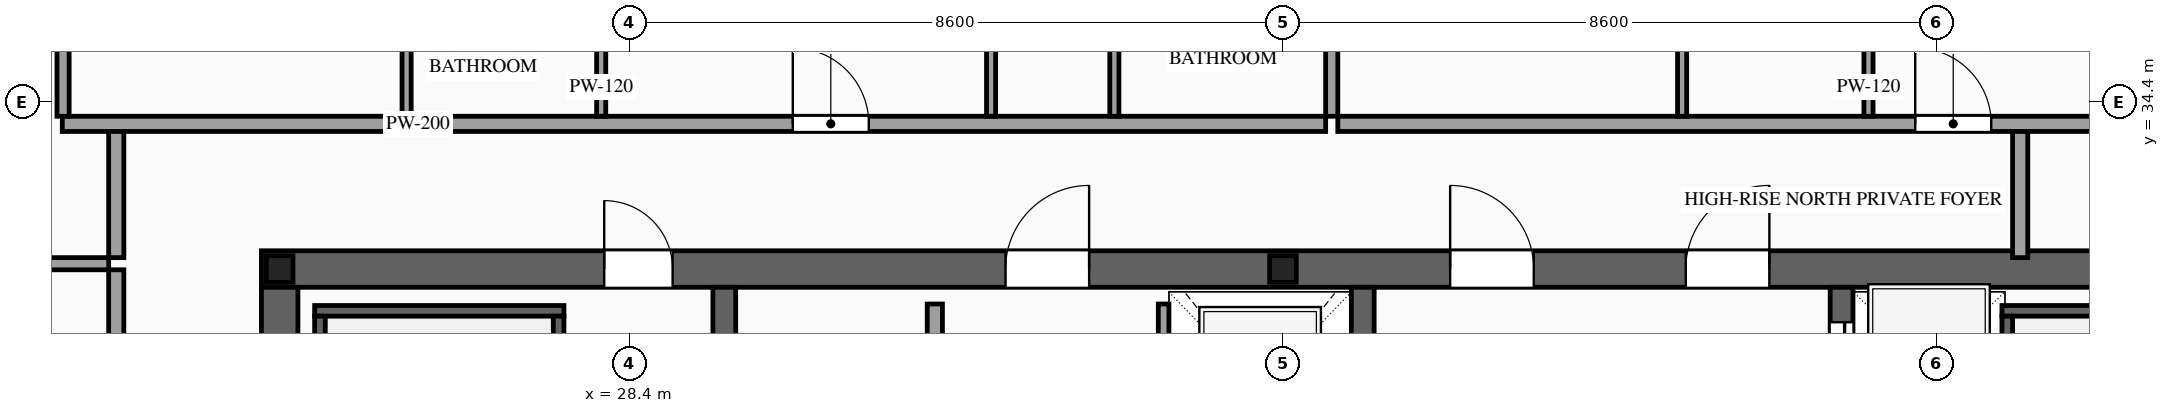
"""IFC4 building model, lengths in metres.
Left out: names, types, materials, properties, quantities, classifications, styles, units other than length and angle.
Written with IfcOpenShell. Run it as: python <this file> out.ifc"""

import sys

from ifc_helpers import new_model, si_unit, direction, frame, frame_2d, origin, origin_2d, place, context, subcontext, project, spatial, rectangle, i_section, extrude, source, transform, mapped, element, fill, save


model = new_model("IFC4")
c1 = context("Model", 3, precision=1e-05, world=origin(), true_north=direction((0.0, 1.0)))
c2 = subcontext(c1, "Body", "Model", "MODEL_VIEW")
j1 = project(units=[si_unit("LENGTHUNIT", "METRE"), si_unit("PLANEANGLEUNIT", "RADIAN")], contexts=[c1])
p1 = place(None, origin())
s1 = spatial("IfcSite", under=j1, at=p1, CompositionType="ELEMENT")
p2 = place(p1, origin())
s2 = spatial("IfcBuilding", under=s1, at=p2, CompositionType="ELEMENT")
p3 = place(p2, frame((0.0, 0.0, 285.6)))
s3 = spatial("IfcBuildingStorey", under=s2, at=p3, CompositionType="ELEMENT", Elevation=285.6)
p4 = place(p3, frame((23.56, 32.2, 0.0), z_axis=(0.0, 0.0, 1.0), x_axis=(1.0, 0.0, 0.0)))
e1 = element("IfcWall", 1, at=p4, inside=s3, PredefinedType="SHEAR", context=c2, shape_type="SweptSolid", body=[
    extrude(rectangle(XDim=26.88, YDim=0.48, at=frame_2d((13.44, 0.0))), origin(), (0.0, 0.0, 1.0), 3.5),
])
p5 = place(p4, frame((4.51, 0.0, 0.0)))
e2 = element("IfcOpeningElement", 2, at=p5, cuts=e1, PredefinedType="OPENING", context=c2, shape_type="SweptSolid", body=[
    extrude(rectangle(XDim=0.9, YDim=2.15, at=frame_2d((0.45, 1.075))), frame((0.0, 0.255, 0.0), z_axis=(0.0, -1.0, 0.0), x_axis=(1.0, 0.0, 0.0)), (0.0, 0.0, 1.0), 0.51),
])
p6 = place(p4, frame((9.79, 0.0, 0.0)))
e3 = element("IfcOpeningElement", 3, at=p6, cuts=e1, PredefinedType="OPENING", context=c2, shape_type="SweptSolid", body=[
    extrude(rectangle(XDim=1.1, YDim=2.2, at=frame_2d((0.55, 1.1))), frame((0.0, 0.255, 0.0), z_axis=(0.0, -1.0, 0.0), x_axis=(1.0, 0.0, 0.0)), (0.0, 0.0, 1.0), 0.51),
])
p7 = place(p4, frame((15.64, 0.0, 0.0)))
e4 = element("IfcOpeningElement", 4, at=p7, cuts=e1, PredefinedType="OPENING", context=c2, shape_type="SweptSolid", body=[
    extrude(rectangle(XDim=1.1, YDim=2.2, at=frame_2d((0.55, 1.1))), frame((0.0, 0.255, 0.0), z_axis=(0.0, -1.0, 0.0), x_axis=(1.0, 0.0, 0.0)), (0.0, 0.0, 1.0), 0.51),
])
p8 = place(p4, frame((18.74, 0.0, 0.0)))
e5 = element("IfcOpeningElement", 5, at=p8, cuts=e1, PredefinedType="OPENING", context=c2, shape_type="SweptSolid", body=[
    extrude(rectangle(XDim=1.1, YDim=2.2, at=frame_2d((0.55, 1.1))), frame((0.0, 0.255, 0.0), z_axis=(0.0, -1.0, 0.0), x_axis=(1.0, 0.0, 0.0)), (0.0, 0.0, 1.0), 0.51),
])
m1 = source(origin(), c2, "Body", "SweptSolid", [
    extrude(rectangle(XDim=12.32, YDim=0.48, at=frame_2d((6.16, 0.0))), origin(), (0.0, 0.0, 1.0), 3.5),
])
p9 = place(p3, frame((23.8, 19.64, 0.0), z_axis=(0.0, 0.0, 1.0), x_axis=(0.0, 1.0, 0.0)))
e6 = element("IfcWall", 6, at=p9, inside=s3, PredefinedType="SHEAR", context=c2, shape_type="MappedRepresentation", body=[
    mapped(m1, transform((0.0, 0.0, 0.0), scale=1.0)),
])
m2 = source(origin(), c2, "Body", "SweptSolid", [
    extrude(rectangle(XDim=12.32, YDim=0.3, at=frame_2d((6.16, 0.0))), origin(), (0.0, 0.0, 1.0), 3.5),
])
for number, where, z_axis, x_axis in (
    (7, (29.65, 19.64, 0.0), (0.0, 0.0, 1.0), (0.0, 1.0, 0.0)),
    (8, (38.05, 19.64, 0.0), (0.0, 0.0, 1.0), (0.0, 1.0, 0.0)),
):
    element("IfcWall", number, at=place(p3, frame(where, z_axis=z_axis, x_axis=x_axis)), inside=s3, PredefinedType="SOLIDWALL", context=c2, shape_type="MappedRepresentation", body=[
        mapped(m2, transform((0.0, 0.0, 0.0), scale=1.0)),
    ])
p10 = place(p3, frame((44.35, 19.64, 0.0), z_axis=(0.0, 0.0, 1.0), x_axis=(0.0, 1.0, 0.0)))
e9 = element("IfcWall", 9, at=p10, inside=s3, PredefinedType="SOLIDWALL", context=c2, shape_type="SweptSolid", body=[
    extrude(rectangle(XDim=12.32, YDim=0.3, at=frame_2d((6.16, 0.0))), origin(), (0.0, 0.0, 1.0), 3.5),
])
p11 = place(p10, frame((6.56, 0.0, 0.0)))
e10 = element("IfcOpeningElement", 10, at=p11, cuts=e9, PredefinedType="OPENING", context=c2, shape_type="SweptSolid", body=[
    extrude(rectangle(XDim=1.1, YDim=2.2, at=frame_2d((0.55, 1.1))), frame((0.0, 0.165, 0.0), z_axis=(0.0, -1.0, 0.0), x_axis=(1.0, 0.0, 0.0)), (0.0, 0.0, 1.0), 0.33),
])
p12 = place(p10, frame((8.66, 0.0, 0.0)))
e11 = element("IfcOpeningElement", 11, at=p12, cuts=e9, PredefinedType="OPENING", context=c2, shape_type="SweptSolid", body=[
    extrude(rectangle(XDim=1.1, YDim=2.2, at=frame_2d((0.55, 1.1))), frame((0.0, 0.165, 0.0), z_axis=(0.0, -1.0, 0.0), x_axis=(1.0, 0.0, 0.0)), (0.0, 0.0, 1.0), 0.33),
])
p13 = place(p10, frame((10.76, 0.0, 0.0)))
e12 = element("IfcOpeningElement", 12, at=p13, cuts=e9, PredefinedType="OPENING", context=c2, shape_type="SweptSolid", body=[
    extrude(rectangle(XDim=1.1, YDim=2.2, at=frame_2d((0.55, 1.1))), frame((0.0, 0.165, 0.0), z_axis=(0.0, -1.0, 0.0), x_axis=(1.0, 0.0, 0.0)), (0.0, 0.0, 1.0), 0.33),
])
m3 = source(origin(), c2, "Body", "SweptSolid", [
    extrude(i_section(OverallWidth=0.35, OverallDepth=0.35, WebThickness=0.012, FlangeThickness=0.019, at=origin_2d()), origin(), (0.0, 0.0, 1.0), 3.5),
])
for number, where, z_axis, x_axis in (
    (13, (23.8, 32.2, 0.0), (0.0, 0.0, 1.0), (1.0, 0.0, 0.0)),
    (14, (37.0, 32.2, 0.0), (0.0, 0.0, 1.0), (1.0, 0.0, 0.0)),
):
    element("IfcColumn", number, at=place(p3, frame(where, z_axis=z_axis, x_axis=x_axis)), inside=s3, PredefinedType="COLUMN", context=c2, shape_type="MappedRepresentation", body=[
        mapped(m3, transform((0.0, 0.0, 0.0), scale=1.0)),
    ])
p14 = place(p3, frame((35.43, 29.4, 0.0), z_axis=(0.0, 0.0, 1.0), x_axis=(0.0, 1.0, 0.0)))
e15 = element("IfcWall", 15, at=p14, inside=s3, PredefinedType="SOLIDWALL", context=c2, shape_type="SweptSolid", body=[
    extrude(rectangle(XDim=2.34, YDim=0.14, at=frame_2d((1.17, 0.0))), origin(), (0.0, 0.0, 1.0), 3.28),
])
p15 = place(p14, frame((0.62, 0.0, 0.0)))
e16 = element("IfcOpeningElement", 16, at=p15, cuts=e15, PredefinedType="OPENING", context=c2, shape_type="SweptSolid", body=[
    extrude(rectangle(XDim=1.1, YDim=2.2, at=frame_2d((0.55, 1.1))), frame((0.0, 0.085, 0.0), z_axis=(0.0, -1.0, 0.0), x_axis=(1.0, 0.0, 0.0)), (0.0, 0.0, 1.0), 0.17),
])
m4 = source(origin(), c2, "Body", "SweptSolid", [
    extrude(rectangle(XDim=3.28, YDim=0.14, at=frame_2d((1.64, 0.0))), origin(), (0.0, 0.0, 1.0), 3.28),
])
p16 = place(p3, frame((24.26, 31.65, 0.0), z_axis=(0.0, 0.0, 1.0), x_axis=(1.0, 0.0, 0.0)))
e17 = element("IfcWall", 17, at=p16, inside=s3, PredefinedType="SOLIDWALL", context=c2, shape_type="MappedRepresentation", body=[
    mapped(m4, transform((0.0, 0.0, 0.0), scale=1.0)),
])
m5 = source(origin(), c2, "Body", "SweptSolid", [
    extrude(rectangle(XDim=8.94, YDim=0.14, at=frame_2d((4.47, 0.0))), origin(), (0.0, 0.0, 1.0), 3.28),
])
for number, where, z_axis, x_axis in (
    (18, (24.33, 22.64, 0.0), (0.0, 0.0, 1.0), (0.0, 1.0, 0.0)),
    (19, (27.47, 22.64, 0.0), (0.0, 0.0, 1.0), (0.0, 1.0, 0.0)),
):
    element("IfcWall", number, at=place(p3, frame(where, z_axis=z_axis, x_axis=x_axis)), inside=s3, PredefinedType="SOLIDWALL", context=c2, shape_type="MappedRepresentation", body=[
        mapped(m5, transform((0.0, 0.0, 0.0), scale=1.0)),
    ])
p17 = place(p3, frame((46.46, 31.65, 0.0), z_axis=(0.0, 0.0, 1.0), x_axis=(1.0, 0.0, 0.0)))
e20 = element("IfcWall", 20, at=p17, inside=s3, PredefinedType="SOLIDWALL", context=c2, shape_type="MappedRepresentation", body=[
    mapped(m4, transform((0.0, 0.0, 0.0), scale=1.0)),
])
p18 = place(p3, frame((46.53, 22.64, 0.0), z_axis=(0.0, 0.0, 1.0), x_axis=(0.0, 1.0, 0.0)))
e21 = element("IfcWall", 21, at=p18, inside=s3, PredefinedType="SOLIDWALL", context=c2, shape_type="MappedRepresentation", body=[
    mapped(m5, transform((0.0, 0.0, 0.0), scale=1.0)),
])
p19 = place(p3, frame((32.42, 24.05, 0.0), z_axis=(0.0, 0.0, 1.0), x_axis=(0.0, 1.0, 0.0)))
e22 = element("IfcWall", 22, at=p19, inside=s3, PredefinedType="PARTITIONING", context=c2, shape_type="SweptSolid", body=[
    extrude(rectangle(XDim=7.69, YDim=0.2, at=frame_2d((3.845, 0.0))), origin(), (0.0, 0.0, 1.0), 3.28),
])
p20 = place(p19, frame((3.395, 0.0, 0.0)))
e23 = element("IfcOpeningElement", 23, at=p20, cuts=e22, PredefinedType="OPENING", context=c2, shape_type="SweptSolid", body=[
    extrude(rectangle(XDim=0.9, YDim=2.15, at=frame_2d((0.45, 1.075))), frame((0.0, 0.115, 0.0), z_axis=(0.0, -1.0, 0.0), x_axis=(1.0, 0.0, 0.0)), (0.0, 0.0, 1.0), 0.23),
])
m6 = source(origin(), c2, "Body", "SweptSolid", [
    extrude(rectangle(XDim=1.7, YDim=0.2, at=frame_2d((0.85, 0.0))), origin(), (0.0, 0.0, 1.0), 3.28),
])
for number, where, z_axis, x_axis in (
    (24, (21.65, 32.35, 0.0), (0.0, 0.0, 1.0), (0.0, 1.0, 0.0)),
    (25, (46.7, 32.35, 0.0), (0.0, 0.0, 1.0), (0.0, 1.0, 0.0)),
):
    element("IfcWall", number, at=place(p3, frame(where, z_axis=z_axis, x_axis=x_axis)), inside=s3, PredefinedType="PARTITIONING", context=c2, shape_type="MappedRepresentation", body=[
        mapped(m6, transform((0.0, 0.0, 0.0), scale=1.0)),
    ])
p21 = place(p3, frame((20.94, 34.11, 0.0), z_axis=(0.0, 0.0, 1.0), x_axis=(1.0, 0.0, 0.0)))
e26 = element("IfcWall", 26, at=p21, inside=s3, PredefinedType="PARTITIONING", context=c2, shape_type="SweptSolid", body=[
    extrude(rectangle(XDim=16.622, YDim=0.2, at=frame_2d((8.311, 0.0))), origin(), (0.0, 0.0, 1.0), 3.28),
])
p22 = place(p21, frame((9.611, 0.0, 0.0)))
e27 = element("IfcOpeningElement", 27, at=p22, cuts=e26, PredefinedType="OPENING", context=c2, shape_type="SweptSolid", body=[
    extrude(rectangle(XDim=1.0, YDim=2.2, at=frame_2d((0.5, 1.1))), frame((0.0, 0.115, 0.0), z_axis=(0.0, -1.0, 0.0), x_axis=(1.0, 0.0, 0.0)), (0.0, 0.0, 1.0), 0.23),
])
m7 = source(origin(), c2, "Body", "SweptSolid", [
    extrude(rectangle(XDim=10.54, YDim=0.16, at=frame_2d((5.27, 0.0))), origin(), (0.0, 0.0, 1.0), 3.28),
])
p23 = place(p3, frame((37.642, 34.21, 0.0), z_axis=(0.0, 0.0, 1.0), x_axis=(0.0, 1.0, 0.0)))
e28 = element("IfcWall", 28, at=p23, inside=s3, PredefinedType="PARTITIONING", context=c2, shape_type="MappedRepresentation", body=[
    mapped(m7, transform((0.0, 0.0, 0.0), scale=1.0)),
])
m8 = source(origin(), c2, "Body", "SweptSolid", [
    extrude(rectangle(XDim=2.9, YDim=0.12, at=frame_2d((1.45, 0.0))), origin(), (0.0, 0.0, 1.0), 3.28),
])
p24 = place(p3, frame((25.47, 34.21, 0.0), z_axis=(0.0, 0.0, 1.0), x_axis=(0.0, 1.0, 0.0)))
e29 = element("IfcWall", 29, at=p24, inside=s3, PredefinedType="PARTITIONING", context=c2, shape_type="MappedRepresentation", body=[
    mapped(m8, transform((0.0, 0.0, 0.0), scale=1.0)),
])
p25 = place(p3, frame((28.03, 34.21, 0.0), z_axis=(0.0, 0.0, 1.0), x_axis=(0.0, 1.0, 0.0)))
e30 = element("IfcWall", 30, at=p25, inside=s3, PredefinedType="PARTITIONING", context=c2, shape_type="SweptSolid", body=[
    extrude(rectangle(XDim=2.9, YDim=0.12, at=frame_2d((1.45, 0.0))), origin(), (0.0, 0.0, 1.0), 3.28),
])
p26 = place(p25, frame((1.025, 0.0, 0.0)))
e31 = element("IfcOpeningElement", 31, at=p26, cuts=e30, PredefinedType="OPENING", context=c2, shape_type="SweptSolid", body=[
    extrude(rectangle(XDim=0.85, YDim=2.1, at=frame_2d((0.425, 1.05))), frame((0.0, 0.075, 0.0), z_axis=(0.0, -1.0, 0.0), x_axis=(1.0, 0.0, 0.0)), (0.0, 0.0, 1.0), 0.15),
])
for number, where, z_axis, x_axis in (
    (32, (34.782, 34.21, 0.0), (0.0, 0.0, 1.0), (0.0, 1.0, 0.0)),
    (33, (33.16, 34.21, 0.0), (0.0, 0.0, 1.0), (0.0, 1.0, 0.0)),
):
    element("IfcWall", number, at=place(p3, frame(where, z_axis=z_axis, x_axis=x_axis)), inside=s3, PredefinedType="PARTITIONING", context=c2, shape_type="MappedRepresentation", body=[
        mapped(m8, transform((0.0, 0.0, 0.0), scale=1.0)),
    ])
p27 = place(p3, frame((37.722, 34.11, 0.0), z_axis=(0.0, 0.0, 1.0), x_axis=(1.0, 0.0, 0.0)))
e34 = element("IfcWall", 34, at=p27, inside=s3, PredefinedType="PARTITIONING", context=c2, shape_type="SweptSolid", body=[
    extrude(rectangle(XDim=15.338, YDim=0.2, at=frame_2d((7.669, 0.0))), origin(), (0.0, 0.0, 1.0), 3.28),
])
p28 = place(p27, frame((7.597, 0.0, 0.0)))
e35 = element("IfcOpeningElement", 35, at=p28, cuts=e34, PredefinedType="OPENING", context=c2, shape_type="SweptSolid", body=[
    extrude(rectangle(XDim=1.0, YDim=2.2, at=frame_2d((0.5, 1.1))), frame((0.0, 0.115, 0.0), z_axis=(0.0, -1.0, 0.0), x_axis=(1.0, 0.0, 0.0)), (0.0, 0.0, 1.0), 0.23),
])
m9 = source(origin(), c2, "Body", "SweptSolid", [
    extrude(rectangle(XDim=10.39, YDim=0.16, at=frame_2d((5.195, 0.0))), origin(), (0.0, 0.0, 1.0), 3.28),
])
p29 = place(p3, frame((20.95, 34.21, 0.0), z_axis=(0.0, 0.0, 1.0), x_axis=(0.0, 1.0, 0.0)))
e36 = element("IfcWall", 36, at=p29, inside=s3, PredefinedType="PARTITIONING", context=c2, shape_type="MappedRepresentation", body=[
    mapped(m9, transform((0.0, 0.0, 0.0), scale=1.0)),
])
p30 = place(p3, frame((42.252, 34.21, 0.0), z_axis=(0.0, 0.0, 1.0), x_axis=(0.0, 1.0, 0.0)))
e37 = element("IfcWall", 37, at=p30, inside=s3, PredefinedType="PARTITIONING", context=c2, shape_type="MappedRepresentation", body=[
    mapped(m8, transform((0.0, 0.0, 0.0), scale=1.0)),
])
p31 = place(p3, frame((44.704, 34.21, 0.0), z_axis=(0.0, 0.0, 1.0), x_axis=(0.0, 1.0, 0.0)))
e38 = element("IfcWall", 38, at=p31, inside=s3, PredefinedType="PARTITIONING", context=c2, shape_type="SweptSolid", body=[
    extrude(rectangle(XDim=2.9, YDim=0.12, at=frame_2d((1.45, 0.0))), origin(), (0.0, 0.0, 1.0), 3.28),
])
p32 = place(p31, frame((1.025, 0.0, 0.0)))
e39 = element("IfcOpeningElement", 39, at=p32, cuts=e38, PredefinedType="OPENING", context=c2, shape_type="SweptSolid", body=[
    extrude(rectangle(XDim=0.85, YDim=2.1, at=frame_2d((0.425, 1.05))), frame((0.0, 0.075, 0.0), z_axis=(0.0, -1.0, 0.0), x_axis=(1.0, 0.0, 0.0)), (0.0, 0.0, 1.0), 0.15),
])
p33 = place(p3, frame((21.65, 19.41, 0.0), z_axis=(0.0, 0.0, 1.0), x_axis=(0.0, 1.0, 0.0)))
e40 = element("IfcWall", 40, at=p33, inside=s3, PredefinedType="PARTITIONING", context=c2, shape_type="SweptSolid", body=[
    extrude(rectangle(XDim=12.78, YDim=0.2, at=frame_2d((6.39, 0.0))), origin(), (0.0, 0.0, 1.0), 3.28),
])
p34 = place(p33, frame((5.89, 0.0, 0.0)))
e41 = element("IfcOpeningElement", 41, at=p34, cuts=e40, PredefinedType="OPENING", context=c2, shape_type="SweptSolid", body=[
    extrude(rectangle(XDim=1.0, YDim=2.2, at=frame_2d((0.5, 1.1))), frame((0.0, 0.115, 0.0), z_axis=(0.0, -1.0, 0.0), x_axis=(1.0, 0.0, 0.0)), (0.0, 0.0, 1.0), 0.23),
])
m10 = source(origin(), c2, "Body", "SweptSolid", [
    extrude(rectangle(XDim=3.5, YDim=0.16, at=frame_2d((1.75, 0.0))), origin(), (0.0, 0.0, 1.0), 2.825),
])
p35 = place(p3, frame((18.05, 32.27, 0.0), z_axis=(0.0, 0.0, 1.0), x_axis=(1.0, 0.0, 0.0)))
e42 = element("IfcWall", 42, at=p35, inside=s3, PredefinedType="PARTITIONING", context=c2, shape_type="MappedRepresentation", body=[
    mapped(m10, transform((0.0, 0.0, 0.0), scale=1.0)),
])
m11 = source(origin(), c2, "Body", "SweptSolid", [
    extrude(rectangle(XDim=1.1, YDim=2.2, at=frame_2d((0.55, 1.1))), frame((0.0, 0.025, 0.0), z_axis=(0.0, -1.0, 0.0), x_axis=(1.0, 0.0, 0.0)), (0.0, 0.0, 1.0), 0.05),
])
p36 = place(p13, origin())
e43 = element("IfcDoor", 43, at=p36, inside=s3, OperationType="SLIDING_TO_LEFT", PredefinedType="DOOR", context=c2, shape_type="MappedRepresentation", body=[
    mapped(m11, transform((0.0, 0.0, 0.0), scale=1.0)),
])
fill(e12, e43)
m12 = source(origin(), c2, "Body", "SweptSolid", [
    extrude(rectangle(XDim=0.9, YDim=2.15, at=frame_2d((0.45, 1.075))), frame((0.0, 0.025, 0.0), z_axis=(0.0, -1.0, 0.0), x_axis=(1.0, 0.0, 0.0)), (0.0, 0.0, 1.0), 0.05),
])
p37 = place(p5, origin())
e44 = element("IfcDoor", 44, at=p37, inside=s3, OperationType="SINGLE_SWING_LEFT", PredefinedType="DOOR", context=c2, shape_type="MappedRepresentation", body=[
    mapped(m12, transform((0.0, 0.0, 0.0), scale=1.0)),
])
fill(e2, e44)
m13 = source(origin(), c2, "Body", "SweptSolid", [
    extrude(rectangle(XDim=1.1, YDim=2.2, at=frame_2d((0.55, 1.1))), frame((0.0, 0.025, 0.0), z_axis=(0.0, -1.0, 0.0), x_axis=(1.0, 0.0, 0.0)), (0.0, 0.0, 1.0), 0.05),
])
p38 = place(p6, origin())
e45 = element("IfcDoor", 45, at=p38, inside=s3, OperationType="SINGLE_SWING_RIGHT", PredefinedType="DOOR", context=c2, shape_type="MappedRepresentation", body=[
    mapped(m13, transform((0.0, 0.0, 0.0), scale=1.0)),
])
fill(e3, e45)
p39 = place(p7, origin())
e46 = element("IfcDoor", 46, at=p39, inside=s3, OperationType="SINGLE_SWING_LEFT", PredefinedType="DOOR", context=c2, shape_type="MappedRepresentation", body=[
    mapped(m13, transform((0.0, 0.0, 0.0), scale=1.0)),
])
fill(e4, e46)
p40 = place(p8, origin())
e47 = element("IfcDoor", 47, at=p40, inside=s3, OperationType="SINGLE_SWING_RIGHT", PredefinedType="DOOR", context=c2, shape_type="MappedRepresentation", body=[
    mapped(m13, transform((0.0, 0.0, 0.0), scale=1.0)),
])
fill(e5, e47)
m14 = source(origin(), c2, "Body", "SweptSolid", [
    extrude(rectangle(XDim=1.0, YDim=2.2, at=frame_2d((0.5, 1.1))), frame((0.0, 0.025, 0.0), z_axis=(0.0, -1.0, 0.0), x_axis=(1.0, 0.0, 0.0)), (0.0, 0.0, 1.0), 0.05),
])
p41 = place(p22, origin())
e48 = element("IfcDoor", 48, at=p41, inside=s3, OperationType="SINGLE_SWING_LEFT", PredefinedType="DOOR", context=c2, shape_type="MappedRepresentation", body=[
    mapped(m14, transform((0.0, 0.0, 0.0), scale=1.0)),
])
fill(e27, e48)
p42 = place(p28, origin())
e49 = element("IfcDoor", 49, at=p42, inside=s3, OperationType="SINGLE_SWING_LEFT", PredefinedType="DOOR", context=c2, shape_type="MappedRepresentation", body=[
    mapped(m14, transform((0.0, 0.0, 0.0), scale=1.0)),
])
fill(e35, e49)
save(model, sys.argv[1])
